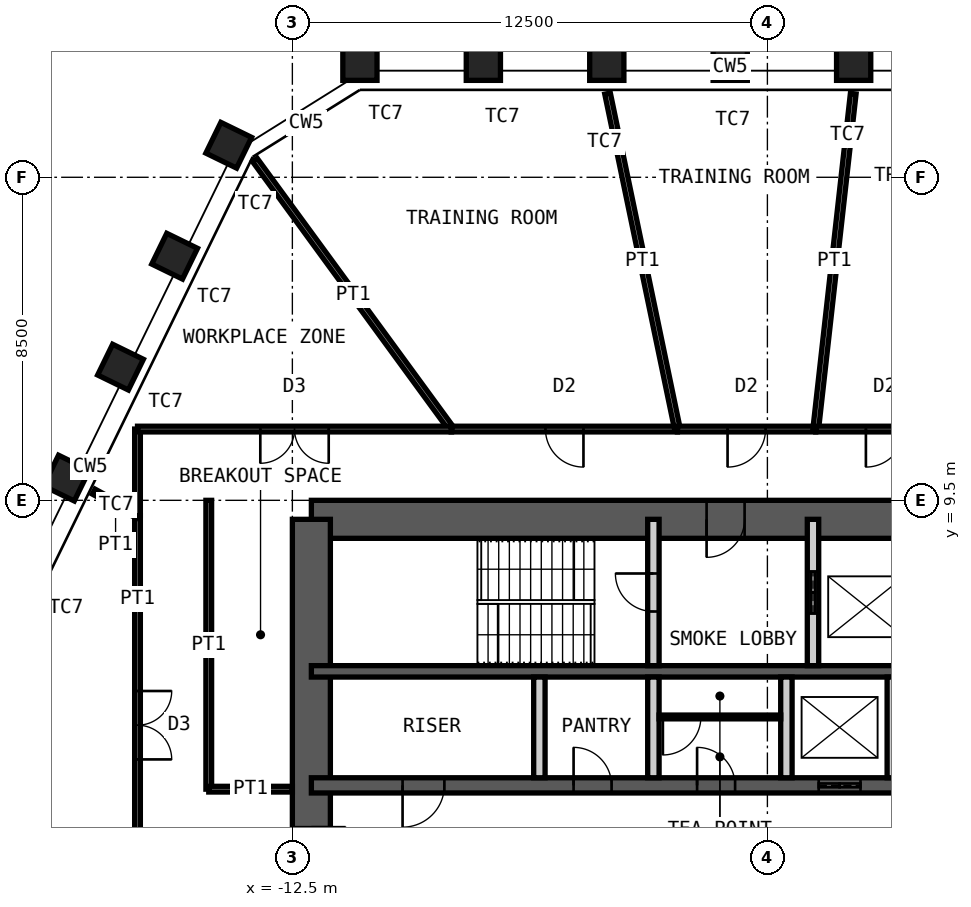
"""IFC4 building model, lengths in metres.
Left out: names, types, materials, properties, quantities, classifications, styles, units other than length and angle.
Written with IfcOpenShell. Run it as: python <this file> out.ifc"""

import sys

from ifc_helpers import new_model, si_unit, direction, frame, frame_2d, origin, origin_2d, place, context, subcontext, project, spatial, rectangle, hollow_rectangle, extrude, element, fill, save


model = new_model("IFC4")
c1 = context("Model", 3, precision=1e-05, world=origin(), true_north=direction((0.0, 1.0)))
c2 = subcontext(c1, "Body", "Model", "MODEL_VIEW")
j1 = project(units=[si_unit("LENGTHUNIT", "METRE"), si_unit("PLANEANGLEUNIT", "RADIAN")], contexts=[c1])
p1 = place(None, origin())
s1 = spatial("IfcSite", under=j1, at=p1, CompositionType="ELEMENT")
p2 = place(p1, origin())
s2 = spatial("IfcBuilding", under=s1, at=p2, CompositionType="ELEMENT")
p3 = place(p2, frame((0.0, 0.0, 278.8)))
s3 = spatial("IfcBuildingStorey", under=s2, at=p3, CompositionType="ELEMENT", Elevation=278.8)
for number, where, z_axis, x_axis in (
    (1, (-10.722, 21.0, 0.0), (0.0, 0.0, 1.0), (-1.0, 0.0, 0.0)),
    (2, (-7.474, 21.0, 0.0), (0.0, 0.0, 1.0), (-1.0, 0.0, 0.0)),
    (3, (-4.226, 21.0, 0.0), (0.0, 0.0, 1.0), (-1.0, 0.0, 0.0)),
    (4, (-0.978, 21.0, 0.0), (0.0, 0.0, 1.0), (-1.0, 0.0, 0.0)),
    (5, (2.27, 21.0, 0.0), (0.0, 0.0, 1.0), (-1.0, 0.0, 0.0)),
    (6, (-18.446, 10.085, 0.0), (0.0, 0.0, 1.0), (-0.438, -0.899, 0.0)),
    (7, (-17.022, 13.004, 0.0), (0.0, 0.0, 1.0), (-0.438, -0.899, 0.0)),
    (8, (-15.598, 15.924, 0.0), (0.0, 0.0, 1.0), (-0.438, -0.899, 0.0)),
    (9, (-14.174, 18.843, 0.0), (0.0, 0.0, 1.0), (-0.438, -0.899, 0.0)),
):
    element("IfcColumn", number, at=place(p3, frame(where, z_axis=z_axis, x_axis=x_axis)), inside=s3, PredefinedType="COLUMN", context=c2, shape_type="SweptSolid", body=[
        extrude(hollow_rectangle(XDim=0.9, YDim=0.9, WallThickness=0.06, at=origin_2d()), origin(), (0.0, 0.0, 1.0), 4.2),
    ])
p4 = place(p3, frame((-12.0, 9.0, 0.0), z_axis=(0.0, 0.0, 1.0), x_axis=(1.0, 0.0, 0.0)))
e10 = element("IfcWall", 10, at=p4, inside=s3, PredefinedType="SHEAR", context=c2, shape_type="SweptSolid", body=[
    extrude(rectangle(XDim=24.0, YDim=1.0, at=frame_2d((12.0, 0.0))), origin(), (0.0, 0.0, 1.0), 4.2),
])
p5 = place(p4, frame((10.4, 0.0, 0.0)))
e11 = element("IfcOpeningElement", 11, at=p5, cuts=e10, PredefinedType="OPENING", context=c2, shape_type="SweptSolid", body=[
    extrude(rectangle(XDim=1.0, YDim=2.1, at=frame_2d((0.5, 1.05))), frame((0.0, 0.51, 0.0), z_axis=(0.0, -1.0, 0.0), x_axis=(1.0, 0.0, 0.0)), (0.0, 0.0, 1.0), 1.02),
])
p6 = place(p4, frame((17.6, 0.0, 0.0)))
e12 = element("IfcOpeningElement", 12, at=p6, cuts=e10, PredefinedType="OPENING", context=c2, shape_type="SweptSolid", body=[
    extrude(rectangle(XDim=0.9, YDim=2.1, at=frame_2d((0.45, 1.05))), frame((0.0, 0.51, 0.0), z_axis=(0.0, -1.0, 0.0), x_axis=(1.0, 0.0, 0.0)), (0.0, 0.0, 1.0), 1.02),
])
p7 = place(p4, frame((21.9, 0.0, 0.0)))
e13 = element("IfcOpeningElement", 13, at=p7, cuts=e10, PredefinedType="OPENING", context=c2, shape_type="SweptSolid", body=[
    extrude(rectangle(XDim=0.9, YDim=2.1, at=frame_2d((0.45, 1.05))), frame((0.0, 0.51, 0.0), z_axis=(0.0, -1.0, 0.0), x_axis=(1.0, 0.0, 0.0)), (0.0, 0.0, 1.0), 1.02),
])
p8 = place(p3, frame((-12.0, -9.0, 0.0), z_axis=(0.0, 0.0, 1.0), x_axis=(0.0, 1.0, 0.0)))
e14 = element("IfcWall", 14, at=p8, inside=s3, PredefinedType="SHEAR", context=c2, shape_type="SweptSolid", body=[
    extrude(rectangle(XDim=18.0, YDim=1.0, at=frame_2d((9.0, 0.0))), origin(), (0.0, 0.0, 1.0), 4.2),
])
p9 = place(p8, frame((8.1, 0.0, 0.0)))
e15 = element("IfcOpeningElement", 15, at=p9, cuts=e14, PredefinedType="OPENING", context=c2, shape_type="SweptSolid", body=[
    extrude(rectangle(XDim=1.8, YDim=2.1, at=frame_2d((0.9, 1.05))), frame((0.0, 0.51, 0.0), z_axis=(0.0, -1.0, 0.0), x_axis=(1.0, 0.0, 0.0)), (0.0, 0.0, 1.0), 1.02),
])
p10 = place(p3, frame((-12.0, 5.0, 0.0), z_axis=(0.0, 0.0, 1.0), x_axis=(1.0, 0.0, 0.0)))
e16 = element("IfcWall", 16, at=p10, inside=s3, PredefinedType="SHEAR", context=c2, shape_type="SweptSolid", body=[
    extrude(rectangle(XDim=24.0, YDim=0.3, at=frame_2d((12.0, 0.0))), origin(), (0.0, 0.0, 1.0), 4.2),
])
p11 = place(p3, frame((-12.0, 2.0, 0.0), z_axis=(0.0, 0.0, 1.0), x_axis=(1.0, 0.0, 0.0)))
e17 = element("IfcWall", 17, at=p11, inside=s3, PredefinedType="SHEAR", context=c2, shape_type="SweptSolid", body=[
    extrude(rectangle(XDim=24.0, YDim=0.4, at=frame_2d((12.0, 0.0))), origin(), (0.0, 0.0, 1.0), 4.2),
])
p12 = place(p11, frame((2.4, 0.0, 0.0)))
e18 = element("IfcOpeningElement", 18, at=p12, cuts=e17, PredefinedType="OPENING", context=c2, shape_type="SweptSolid", body=[
    extrude(rectangle(XDim=1.1, YDim=2.1, at=frame_2d((0.55, 1.05))), frame((0.0, 0.21, 0.0), z_axis=(0.0, -1.0, 0.0), x_axis=(1.0, 0.0, 0.0)), (0.0, 0.0, 1.0), 0.42),
])
p13 = place(p11, frame((22.0, 0.0, 0.0)))
e19 = element("IfcOpeningElement", 19, at=p13, cuts=e17, PredefinedType="OPENING", context=c2, shape_type="SweptSolid", body=[
    extrude(rectangle(XDim=1.1, YDim=2.1, at=frame_2d((0.55, 1.05))), frame((0.0, 0.21, 0.0), z_axis=(0.0, -1.0, 0.0), x_axis=(1.0, 0.0, 0.0)), (0.0, 0.0, 1.0), 0.42),
])
p14 = place(p11, frame((10.15, 0.0, 0.0)))
e20 = element("IfcOpeningElement", 20, at=p14, cuts=e17, PredefinedType="OPENING", context=c2, shape_type="SweptSolid", body=[
    extrude(rectangle(XDim=1.0, YDim=2.1, at=frame_2d((0.5, 1.05))), frame((0.0, 0.21, 0.0), z_axis=(0.0, -1.0, 0.0), x_axis=(1.0, 0.0, 0.0)), (0.0, 0.0, 1.0), 0.42),
])
p15 = place(p11, frame((6.9, 0.0, 0.0)))
e21 = element("IfcOpeningElement", 21, at=p15, cuts=e17, PredefinedType="OPENING", context=c2, shape_type="SweptSolid", body=[
    extrude(rectangle(XDim=1.0, YDim=2.1, at=frame_2d((0.5, 1.05))), frame((0.0, 0.21, 0.0), z_axis=(0.0, -1.0, 0.0), x_axis=(1.0, 0.0, 0.0)), (0.0, 0.0, 1.0), 0.42),
])
p16 = place(p11, frame((13.35, 0.0, 0.0)))
e22 = element("IfcOpeningElement", 22, at=p16, cuts=e17, PredefinedType="OPENING", context=c2, shape_type="SweptSolid", body=[
    extrude(rectangle(XDim=1.1, YDim=2.4, at=frame_2d((0.55, 1.2))), frame((0.0, 0.21, 0.0), z_axis=(0.0, -1.0, 0.0), x_axis=(1.0, 0.0, 0.0)), (0.0, 0.0, 1.0), 0.42),
])
p17 = place(p11, frame((16.15, 0.0, 0.0)))
e23 = element("IfcOpeningElement", 23, at=p17, cuts=e17, PredefinedType="OPENING", context=c2, shape_type="SweptSolid", body=[
    extrude(rectangle(XDim=1.1, YDim=2.4, at=frame_2d((0.55, 1.2))), frame((0.0, 0.21, 0.0), z_axis=(0.0, -1.0, 0.0), x_axis=(1.0, 0.0, 0.0)), (0.0, 0.0, 1.0), 0.42),
])
p18 = place(p11, frame((19.0, 0.0, 0.0)))
e24 = element("IfcOpeningElement", 24, at=p18, cuts=e17, PredefinedType="OPENING", context=c2, shape_type="SweptSolid", body=[
    extrude(rectangle(XDim=1.0, YDim=2.1, at=frame_2d((0.5, 1.05))), frame((0.0, 0.21, 0.0), z_axis=(0.0, -1.0, 0.0), x_axis=(1.0, 0.0, 0.0)), (0.0, 0.0, 1.0), 0.42),
])
p19 = place(p3, frame((-3.0, 5.15, 0.0), z_axis=(0.0, 0.0, 1.0), x_axis=(0.0, 1.0, 0.0)))
e25 = element("IfcWall", 25, at=p19, inside=s3, PredefinedType="PARTITIONING", context=c2, shape_type="SweptSolid", body=[
    extrude(rectangle(XDim=3.85, YDim=0.3, at=frame_2d((1.925, 0.0))), origin(), (0.0, 0.0, 1.0), 3.98),
])
p20 = place(p19, frame((1.425, 0.0, 0.0)))
e26 = element("IfcOpeningElement", 26, at=p20, cuts=e25, PredefinedType="OPENING", context=c2, shape_type="SweptSolid", body=[
    extrude(rectangle(XDim=1.0, YDim=2.1, at=frame_2d((0.5, 1.05))), frame((0.0, 0.16, 0.0), z_axis=(0.0, -1.0, 0.0), x_axis=(1.0, 0.0, 0.0)), (0.0, 0.0, 1.0), 0.32),
])
p21 = place(p3, frame((1.2, 5.15, 0.0), z_axis=(0.0, 0.0, 1.0), x_axis=(0.0, 1.0, 0.0)))
e27 = element("IfcWall", 27, at=p21, inside=s3, PredefinedType="PARTITIONING", context=c2, shape_type="SweptSolid", body=[
    extrude(rectangle(XDim=3.85, YDim=0.3, at=frame_2d((1.925, 0.0))), origin(), (0.0, 0.0, 1.0), 3.98),
])
p22 = place(p21, frame((1.375, 0.0, 0.0)))
e28 = element("IfcOpeningElement", 28, at=p22, cuts=e27, PredefinedType="OPENING", context=c2, shape_type="SweptSolid", body=[
    extrude(rectangle(XDim=1.1, YDim=2.4, at=frame_2d((0.55, 1.2))), frame((0.0, 0.16, 0.0), z_axis=(0.0, -1.0, 0.0), x_axis=(1.0, 0.0, 0.0)), (0.0, 0.0, 1.0), 0.32),
])
for number, where, z_axis, x_axis in (
    (29, (-6.0, 2.2, 0.0), (0.0, 0.0, 1.0), (0.0, 1.0, 0.0)),
    (30, (-3.0, 2.2, 0.0), (0.0, 0.0, 1.0), (0.0, 1.0, 0.0)),
    (31, (0.5, 2.2, 0.0), (0.0, 0.0, 1.0), (0.0, 1.0, 0.0)),
    (32, (3.3, 2.2, 0.0), (0.0, 0.0, 1.0), (0.0, 1.0, 0.0)),
):
    element("IfcWall", number, at=place(p3, frame(where, z_axis=z_axis, x_axis=x_axis)), inside=s3, PredefinedType="PARTITIONING", context=c2, shape_type="SweptSolid", body=[
        extrude(rectangle(XDim=2.65, YDim=0.3, at=frame_2d((1.325, 0.0))), origin(), (0.0, 0.0, 1.0), 3.98),
    ])
p23 = place(p3, frame((-2.85, 3.8, 0.0), z_axis=(0.0, 0.0, 1.0), x_axis=(1.0, 0.0, 0.0)))
e33 = element("IfcWall", 33, at=p23, inside=s3, PredefinedType="PARTITIONING", context=c2, shape_type="SweptSolid", body=[
    extrude(rectangle(XDim=3.2, YDim=0.1, at=frame_2d((1.6, 0.0))), origin(), (0.0, 0.0, 1.0), 3.98),
])
p24 = place(p23, frame((0.1, 0.0, 0.0)))
e34 = element("IfcOpeningElement", 34, at=p24, cuts=e33, PredefinedType="OPENING", context=c2, shape_type="SweptSolid", body=[
    extrude(rectangle(XDim=1.0, YDim=2.4, at=frame_2d((0.5, 1.2))), frame((0.0, 0.06, 0.0), z_axis=(0.0, -1.0, 0.0), x_axis=(1.0, 0.0, 0.0)), (0.0, 0.0, 1.0), 0.12),
])
p25 = place(p3, frame((-13.486, 18.455, 0.0), z_axis=(0.0, 0.0, 1.0), x_axis=(0.589997742419, -0.807404894672, 0.0)))
e35 = element("IfcWall", 35, at=p25, inside=s3, PredefinedType="PARTITIONING", context=c2, shape_type="SweptSolid", body=[
    extrude(rectangle(XDim=8.769, YDim=0.15, at=frame_2d((4.385, 0.0))), origin(), (0.0, 0.0, 1.0), 2.93),
])
p26 = place(p3, frame((-8.312, 11.375, 0.0), z_axis=(0.0, 0.0, 1.0), x_axis=(1.0, 0.0, 0.0)))
e36 = element("IfcWall", 36, at=p26, inside=s3, PredefinedType="PARTITIONING", context=c2, shape_type="SweptSolid", body=[
    extrude(rectangle(XDim=5.944, YDim=0.15, at=frame_2d((2.972, 0.0))), origin(), (0.0, 0.0, 1.0), 4.03),
])
p27 = place(p26, frame((2.472, 0.0, 0.0)))
e37 = element("IfcOpeningElement", 37, at=p27, cuts=e36, PredefinedType="OPENING", context=c2, shape_type="SweptSolid", body=[
    extrude(rectangle(XDim=1.0, YDim=2.4, at=frame_2d((0.5, 1.2))), frame((0.0, 0.085, 0.0), z_axis=(0.0, -1.0, 0.0), x_axis=(1.0, 0.0, 0.0)), (0.0, 0.0, 1.0), 0.17),
])
p28 = place(p3, frame((-4.206, 20.202, 0.0), z_axis=(0.0, 0.0, 1.0), x_axis=(0.203811521205, -0.979010144904, 0.0)))
e38 = element("IfcWall", 38, at=p28, inside=s3, PredefinedType="PARTITIONING", context=c2, shape_type="SweptSolid", body=[
    extrude(rectangle(XDim=9.016, YDim=0.15, at=frame_2d((4.508, 0.0))), origin(), (0.0, 0.0, 1.0), 3.33),
])
p29 = place(p3, frame((-2.368, 11.375, 0.0), z_axis=(0.0, 0.0, 1.0), x_axis=(1.0, 0.0, 0.0)))
e39 = element("IfcWall", 39, at=p29, inside=s3, PredefinedType="PARTITIONING", context=c2, shape_type="SweptSolid", body=[
    extrude(rectangle(XDim=3.64, YDim=0.15, at=frame_2d((1.82, 0.0))), origin(), (0.0, 0.0, 1.0), 4.03),
])
p30 = place(p29, frame((1.32, 0.0, 0.0)))
e40 = element("IfcOpeningElement", 40, at=p30, cuts=e39, PredefinedType="OPENING", context=c2, shape_type="SweptSolid", body=[
    extrude(rectangle(XDim=1.0, YDim=2.4, at=frame_2d((0.5, 1.2))), frame((0.0, 0.085, 0.0), z_axis=(0.0, -1.0, 0.0), x_axis=(1.0, 0.0, 0.0)), (0.0, 0.0, 1.0), 0.17),
])
p31 = place(p3, frame((2.259, 20.201, 0.0), z_axis=(0.0, 0.0, 1.0), x_axis=(-0.11111945026, -0.993807057619, 0.0)))
e41 = element("IfcWall", 41, at=p31, inside=s3, PredefinedType="PARTITIONING", context=c2, shape_type="SweptSolid", body=[
    extrude(rectangle(XDim=8.881, YDim=0.15, at=frame_2d((4.44, 0.0))), origin(), (0.0, 0.0, 1.0), 3.33),
])
p32 = place(p3, frame((1.272, 11.375, 0.0), z_axis=(0.0, 0.0, 1.0), x_axis=(1.0, 0.0, 0.0)))
e42 = element("IfcWall", 42, at=p32, inside=s3, PredefinedType="PARTITIONING", context=c2, shape_type="SweptSolid", body=[
    extrude(rectangle(XDim=3.64, YDim=0.15, at=frame_2d((1.82, 0.0))), origin(), (0.0, 0.0, 1.0), 4.03),
])
p33 = place(p32, frame((1.32, 0.0, 0.0)))
e43 = element("IfcOpeningElement", 43, at=p33, cuts=e42, PredefinedType="OPENING", context=c2, shape_type="SweptSolid", body=[
    extrude(rectangle(XDim=1.0, YDim=2.4, at=frame_2d((0.5, 1.2))), frame((0.0, 0.085, 0.0), z_axis=(0.0, -1.0, 0.0), x_axis=(1.0, 0.0, 0.0)), (0.0, 0.0, 1.0), 0.17),
])
p34 = place(p3, frame((-16.575, -1.931, 0.0), z_axis=(0.0, 0.0, 1.0), x_axis=(0.0, 1.0, 0.0)))
e44 = element("IfcWall", 44, at=p34, inside=s3, PredefinedType="PARTITIONING", context=c2, shape_type="SweptSolid", body=[
    extrude(rectangle(XDim=11.028, YDim=0.15, at=frame_2d((5.514, 0.0))), origin(), (0.0, 0.0, 1.0), 4.03),
])
p35 = place(p34, frame((4.614, 0.0, 0.0)))
e45 = element("IfcOpeningElement", 45, at=p35, cuts=e44, PredefinedType="OPENING", context=c2, shape_type="SweptSolid", body=[
    extrude(rectangle(XDim=1.8, YDim=2.4, at=frame_2d((0.9, 1.2))), frame((0.0, 0.085, 0.0), z_axis=(0.0, -1.0, 0.0), x_axis=(1.0, 0.0, 0.0)), (0.0, 0.0, 1.0), 0.17),
])
p36 = place(p3, frame((-17.729, 9.73, 0.0), z_axis=(0.0, 0.0, 1.0), x_axis=(0.87667364743, -0.481085559855, 0.0)))
e46 = element("IfcWall", 46, at=p36, inside=s3, PredefinedType="PARTITIONING", context=c2, shape_type="SweptSolid", body=[
    extrude(rectangle(XDim=1.316, YDim=0.15, at=frame_2d((0.658, 0.0))), origin(), (0.0, 0.0, 1.0), 3.33),
])
p37 = place(p3, frame((-16.575, 9.097, 0.0), z_axis=(0.0, 0.0, 1.0), x_axis=(0.0, 1.0, 0.0)))
e47 = element("IfcWall", 47, at=p37, inside=s3, PredefinedType="PARTITIONING", context=c2, shape_type="SweptSolid", body=[
    extrude(rectangle(XDim=2.278, YDim=0.15, at=frame_2d((1.139, 0.0))), origin(), (0.0, 0.0, 1.0), 4.03),
])
p38 = place(p3, frame((-16.575, 11.375, 0.0), z_axis=(0.0, 0.0, 1.0), x_axis=(1.0, 0.0, 0.0)))
e48 = element("IfcWall", 48, at=p38, inside=s3, PredefinedType="PARTITIONING", context=c2, shape_type="SweptSolid", body=[
    extrude(rectangle(XDim=8.263, YDim=0.15, at=frame_2d((4.131, 0.0))), origin(), (0.0, 0.0, 1.0), 4.03),
])
p39 = place(p38, frame((3.231, 0.0, 0.0)))
e49 = element("IfcOpeningElement", 49, at=p39, cuts=e48, PredefinedType="OPENING", context=c2, shape_type="SweptSolid", body=[
    extrude(rectangle(XDim=1.8, YDim=2.4, at=frame_2d((0.9, 1.2))), frame((0.0, 0.085, 0.0), z_axis=(0.0, -1.0, 0.0), x_axis=(1.0, 0.0, 0.0)), (0.0, 0.0, 1.0), 0.17),
])
p40 = place(p3, frame((-14.7, 1.9, 0.0), z_axis=(0.0, 0.0, 1.0), x_axis=(0.0, 1.0, 0.0)))
e50 = element("IfcWall", 50, at=p40, inside=s3, PredefinedType="PARTITIONING", context=c2, shape_type="SweptSolid", body=[
    extrude(rectangle(XDim=7.6, YDim=0.15, at=frame_2d((3.8, 0.0))), origin(), (0.0, 0.0, 1.0), 4.03),
])
p41 = place(p3, frame((-12.5, 1.9, 0.0), z_axis=(0.0, 0.0, 1.0), x_axis=(-1.0, 0.0, 0.0)))
e51 = element("IfcWall", 51, at=p41, inside=s3, PredefinedType="PARTITIONING", context=c2, shape_type="SweptSolid", body=[
    extrude(rectangle(XDim=2.2, YDim=0.15, at=frame_2d((1.1, 0.0))), origin(), (0.0, 0.0, 1.0), 3.53),
])
p42 = place(p5, origin())
e52 = element("IfcDoor", 52, at=p42, inside=s3, OperationType="SINGLE_SWING_LEFT", PredefinedType="DOOR", context=c2, shape_type="SweptSolid", body=[
    extrude(rectangle(XDim=1.0, YDim=2.1, at=frame_2d((0.5, 1.05))), frame((0.0, 0.025, 0.0), z_axis=(0.0, -1.0, 0.0), x_axis=(1.0, 0.0, 0.0)), (0.0, 0.0, 1.0), 0.05),
])
fill(e11, e52)
p43 = place(p20, origin())
e53 = element("IfcDoor", 53, at=p43, inside=s3, OperationType="SINGLE_SWING_LEFT", PredefinedType="DOOR", context=c2, shape_type="SweptSolid", body=[
    extrude(rectangle(XDim=1.0, YDim=2.1, at=frame_2d((0.5, 1.05))), frame((0.0, 0.025, 0.0), z_axis=(0.0, -1.0, 0.0), x_axis=(1.0, 0.0, 0.0)), (0.0, 0.0, 1.0), 0.05),
])
fill(e26, e53)
p44 = place(p12, origin())
e54 = element("IfcDoor", 54, at=p44, inside=s3, OperationType="SINGLE_SWING_LEFT", PredefinedType="DOOR", context=c2, shape_type="SweptSolid", body=[
    extrude(rectangle(XDim=1.1, YDim=2.1, at=frame_2d((0.55, 1.05))), frame((0.0, 0.025, 0.0), z_axis=(0.0, -1.0, 0.0), x_axis=(1.0, 0.0, 0.0)), (0.0, 0.0, 1.0), 0.05),
])
fill(e18, e54)
p45 = place(p14, origin())
e55 = element("IfcDoor", 55, at=p45, inside=s3, OperationType="SINGLE_SWING_RIGHT", PredefinedType="DOOR", context=c2, shape_type="SweptSolid", body=[
    extrude(rectangle(XDim=1.0, YDim=2.1, at=frame_2d((0.5, 1.05))), frame((0.0, 0.025, 0.0), z_axis=(0.0, -1.0, 0.0), x_axis=(1.0, 0.0, 0.0)), (0.0, 0.0, 1.0), 0.05),
])
fill(e20, e55)
p46 = place(p9, origin())
e56 = element("IfcDoor", 56, at=p46, inside=s3, OperationType="DOUBLE_DOOR_DOUBLE_SWING", PredefinedType="DOOR", context=c2, shape_type="SweptSolid", body=[
    extrude(rectangle(XDim=1.8, YDim=2.1, at=frame_2d((0.9, 1.05))), frame((0.0, 0.025, 0.0), z_axis=(0.0, -1.0, 0.0), x_axis=(1.0, 0.0, 0.0)), (0.0, 0.0, 1.0), 0.05),
])
fill(e15, e56)
p47 = place(p22, origin())
e57 = element("IfcDoor", 57, at=p47, inside=s3, OperationType="DOUBLE_DOOR_SLIDING", PredefinedType="DOOR", context=c2, shape_type="SweptSolid", body=[
    extrude(rectangle(XDim=1.1, YDim=2.4, at=frame_2d((0.55, 1.2))), frame((0.0, 0.025, 0.0), z_axis=(0.0, -1.0, 0.0), x_axis=(1.0, 0.0, 0.0)), (0.0, 0.0, 1.0), 0.05),
])
fill(e28, e57)
p48 = place(p15, origin())
e58 = element("IfcDoor", 58, at=p48, inside=s3, OperationType="SINGLE_SWING_RIGHT", PredefinedType="DOOR", context=c2, shape_type="SweptSolid", body=[
    extrude(rectangle(XDim=1.0, YDim=2.1, at=frame_2d((0.5, 1.05))), frame((0.0, 0.025, 0.0), z_axis=(0.0, -1.0, 0.0), x_axis=(1.0, 0.0, 0.0)), (0.0, 0.0, 1.0), 0.05),
])
fill(e21, e58)
p49 = place(p16, origin())
e59 = element("IfcDoor", 59, at=p49, inside=s3, OperationType="DOUBLE_DOOR_SLIDING", PredefinedType="DOOR", context=c2, shape_type="SweptSolid", body=[
    extrude(rectangle(XDim=1.1, YDim=2.4, at=frame_2d((0.55, 1.2))), frame((0.0, 0.025, 0.0), z_axis=(0.0, -1.0, 0.0), x_axis=(1.0, 0.0, 0.0)), (0.0, 0.0, 1.0), 0.05),
])
fill(e22, e59)
p50 = place(p24, origin())
e60 = element("IfcDoor", 60, at=p50, inside=s3, OperationType="SINGLE_SWING_LEFT", PredefinedType="DOOR", context=c2, shape_type="SweptSolid", body=[
    extrude(rectangle(XDim=1.0, YDim=2.4, at=frame_2d((0.5, 1.2))), frame((0.0, 0.025, 0.0), z_axis=(0.0, -1.0, 0.0), x_axis=(1.0, 0.0, 0.0)), (0.0, 0.0, 1.0), 0.05),
])
fill(e34, e60)
p51 = place(p27, origin())
e61 = element("IfcDoor", 61, at=p51, inside=s3, OperationType="SINGLE_SWING_RIGHT", PredefinedType="DOOR", context=c2, shape_type="SweptSolid", body=[
    extrude(rectangle(XDim=1.0, YDim=2.4, at=frame_2d((0.5, 1.2))), frame((0.0, 0.025, 0.0), z_axis=(0.0, -1.0, 0.0), x_axis=(1.0, 0.0, 0.0)), (0.0, 0.0, 1.0), 0.05),
])
fill(e37, e61)
p52 = place(p30, origin())
e62 = element("IfcDoor", 62, at=p52, inside=s3, OperationType="SINGLE_SWING_LEFT", PredefinedType="DOOR", context=c2, shape_type="SweptSolid", body=[
    extrude(rectangle(XDim=1.0, YDim=2.4, at=frame_2d((0.5, 1.2))), frame((0.0, 0.025, 0.0), z_axis=(0.0, -1.0, 0.0), x_axis=(1.0, 0.0, 0.0)), (0.0, 0.0, 1.0), 0.05),
])
fill(e40, e62)
p53 = place(p33, origin())
e63 = element("IfcDoor", 63, at=p53, inside=s3, OperationType="SINGLE_SWING_LEFT", PredefinedType="DOOR", context=c2, shape_type="SweptSolid", body=[
    extrude(rectangle(XDim=1.0, YDim=2.4, at=frame_2d((0.5, 1.2))), frame((0.0, 0.025, 0.0), z_axis=(0.0, -1.0, 0.0), x_axis=(1.0, 0.0, 0.0)), (0.0, 0.0, 1.0), 0.05),
])
fill(e43, e63)
p54 = place(p35, origin())
e64 = element("IfcDoor", 64, at=p54, inside=s3, OperationType="DOUBLE_DOOR_DOUBLE_SWING", PredefinedType="DOOR", context=c2, shape_type="SweptSolid", body=[
    extrude(rectangle(XDim=1.8, YDim=2.4, at=frame_2d((0.9, 1.2))), frame((0.0, 0.025, 0.0), z_axis=(0.0, -1.0, 0.0), x_axis=(1.0, 0.0, 0.0)), (0.0, 0.0, 1.0), 0.05),
])
fill(e45, e64)
p55 = place(p39, origin())
e65 = element("IfcDoor", 65, at=p55, inside=s3, OperationType="DOUBLE_DOOR_DOUBLE_SWING", PredefinedType="DOOR", context=c2, shape_type="SweptSolid", body=[
    extrude(rectangle(XDim=1.8, YDim=2.4, at=frame_2d((0.9, 1.2))), frame((0.0, 0.025, 0.0), z_axis=(0.0, -1.0, 0.0), x_axis=(1.0, 0.0, 0.0)), (0.0, 0.0, 1.0), 0.05),
])
fill(e49, e65)
save(model, sys.argv[1])
